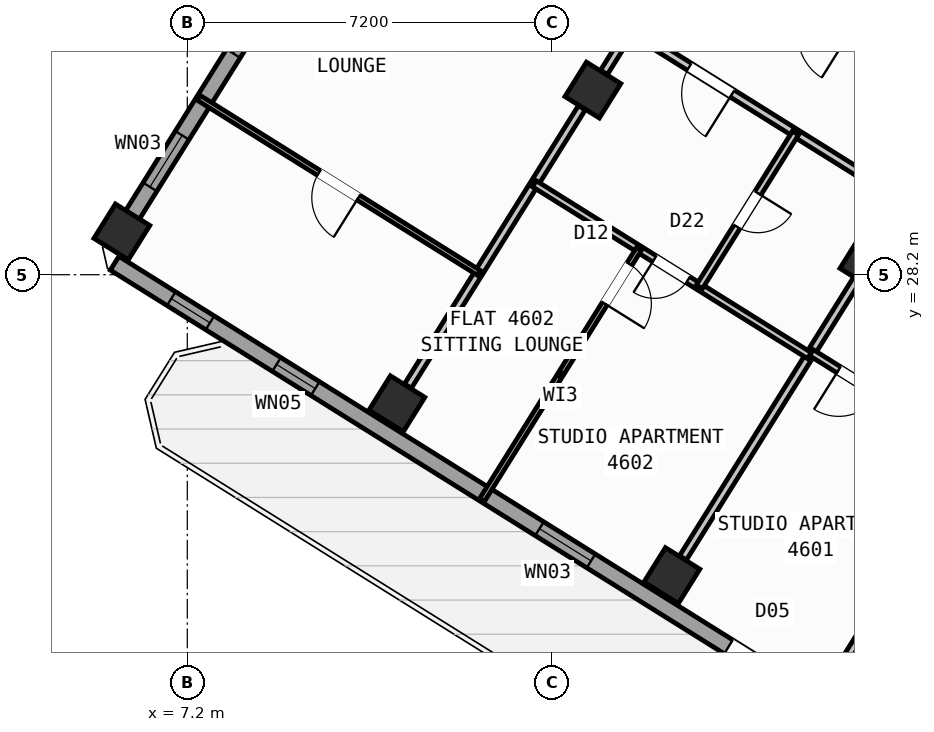
"""IFC4 building model, lengths in metres.
Left out: names, types, materials, properties, quantities, classifications, styles, units other than length and angle.
Written with IfcOpenShell. Run it as: python <this file> out.ifc"""

import sys

from ifc_helpers import new_model, si_unit, direction, frame, frame_2d, origin, origin_2d, place, context, subcontext, project, spatial, rectangle, hollow_rectangle, extrude, source, transform, mapped, element, fill, save


model = new_model("IFC4")
c1 = context("Model", 3, precision=1e-05, world=origin(), true_north=direction((0.0, 1.0)))
c2 = subcontext(c1, "Body", "Model", "MODEL_VIEW")
j1 = project(units=[si_unit("LENGTHUNIT", "METRE"), si_unit("PLANEANGLEUNIT", "RADIAN")], contexts=[c1])
p1 = place(None, origin())
s1 = spatial("IfcSite", under=j1, at=p1, CompositionType="ELEMENT")
p2 = place(p1, origin())
s2 = spatial("IfcBuilding", under=s1, at=p2, CompositionType="ELEMENT")
p3 = place(p2, frame((0.0, 0.0, 184.2)))
s3 = spatial("IfcBuildingStorey", under=s2, at=p3, CompositionType="ELEMENT", Elevation=184.2)
m1 = source(origin(), c2, "Body", "SweptSolid", [
    extrude(hollow_rectangle(XDim=0.8, YDim=0.8, WallThickness=0.032, at=origin_2d()), origin(), (0.0, 0.0, 1.0), 3.6),
])
for number, where, z_axis, x_axis in (
    (1, (20.632, 28.452, 0.0), (0.0, 0.0, 1.0), (-0.848, 0.53, 0.0)),
    (2, (16.764, 22.261, 0.0), (0.0, 0.0, 1.0), (-0.848, 0.53, 0.0)),
    (3, (15.205, 31.844, 0.0), (0.0, 0.0, 1.0), (-0.848, 0.53, 0.0)),
    (4, (11.336, 25.653, 0.0), (0.0, 0.0, 1.0), (-0.848, 0.53, 0.0)),
    (5, (5.909, 29.044, 0.0), (0.0, 0.0, 1.0), (-0.848, 0.53, 0.0)),
):
    element("IfcColumn", number, at=place(p3, frame(where, z_axis=z_axis, x_axis=x_axis)), inside=s3, PredefinedType="COLUMN", context=c2, shape_type="MappedRepresentation", body=[
        mapped(m1, transform((0.0, 0.0, 0.0), scale=1.0)),
    ])
p4 = place(p3, frame((31.76, 12.183, 0.0), z_axis=(0.0, 0.0, 1.0), x_axis=(-0.848047074256, 0.529920899612, 0.0)))
e6 = element("IfcWall", 6, at=p4, inside=s3, PredefinedType="STANDARD", context=c2, shape_type="SweptSolid", body=[
    extrude(rectangle(XDim=30.652, YDim=0.32, at=frame_2d((15.326, 0.0))), origin(), (0.0, 0.0, 1.0), 3.35),
])
p5 = place(p4, frame((15.166, 0.0, 0.0)))
e7 = element("IfcOpeningElement", 7, at=p5, cuts=e6, PredefinedType="OPENING", context=c2, shape_type="SweptSolid", body=[
    extrude(rectangle(XDim=1.2, YDim=2.15, at=frame_2d((0.6, 1.075))), frame((0.0, 0.17, 0.0), z_axis=(0.0, -1.0, 0.0), x_axis=(1.0, 0.0, 0.0)), (0.0, 0.0, 1.0), 0.34),
])
p6 = place(p4, frame((2.015, 0.0, 0.8)))
e8 = element("IfcOpeningElement", 8, at=p6, cuts=e6, PredefinedType="OPENING", context=c2, shape_type="SweptSolid", body=[
    extrude(rectangle(XDim=2.1, YDim=1.55, at=frame_2d((1.05, 0.775))), frame((0.0, 0.17, 0.0), z_axis=(0.0, -1.0, 0.0), x_axis=(1.0, 0.0, 0.0)), (0.0, 0.0, 1.0), 0.34),
])
p7 = place(p4, frame((7.244, 0.0, 0.8)))
e9 = element("IfcOpeningElement", 9, at=p7, cuts=e6, PredefinedType="OPENING", context=c2, shape_type="SweptSolid", body=[
    extrude(rectangle(XDim=2.1, YDim=1.55, at=frame_2d((1.05, 0.775))), frame((0.0, 0.17, 0.0), z_axis=(0.0, -1.0, 0.0), x_axis=(1.0, 0.0, 0.0)), (0.0, 0.0, 1.0), 0.34),
])
p8 = place(p4, frame((12.623, 0.0, 1.0)))
e10 = element("IfcOpeningElement", 10, at=p8, cuts=e6, PredefinedType="OPENING", context=c2, shape_type="SweptSolid", body=[
    extrude(rectangle(XDim=0.9, YDim=1.25, at=frame_2d((0.45, 0.625))), frame((0.0, 0.17, 0.0), z_axis=(0.0, -1.0, 0.0), x_axis=(1.0, 0.0, 0.0)), (0.0, 0.0, 1.0), 0.34),
])
p9 = place(p4, frame((19.565, 0.0, 0.95)))
e11 = element("IfcOpeningElement", 11, at=p9, cuts=e6, PredefinedType="OPENING", context=c2, shape_type="SweptSolid", body=[
    extrude(rectangle(XDim=1.2, YDim=1.4, at=frame_2d((0.6, 0.7))), frame((0.0, 0.17, 0.0), z_axis=(0.0, -1.0, 0.0), x_axis=(1.0, 0.0, 0.0)), (0.0, 0.0, 1.0), 0.34),
])
p10 = place(p4, frame((25.983, 0.0, 1.0)))
e12 = element("IfcOpeningElement", 12, at=p10, cuts=e6, PredefinedType="OPENING", context=c2, shape_type="SweptSolid", body=[
    extrude(rectangle(XDim=0.9, YDim=1.25, at=frame_2d((0.45, 0.625))), frame((0.0, 0.17, 0.0), z_axis=(0.0, -1.0, 0.0), x_axis=(1.0, 0.0, 0.0)), (0.0, 0.0, 1.0), 0.34),
])
p11 = place(p4, frame((28.433, 0.0, 1.0)))
e13 = element("IfcOpeningElement", 13, at=p11, cuts=e6, PredefinedType="OPENING", context=c2, shape_type="SweptSolid", body=[
    extrude(rectangle(XDim=0.9, YDim=1.25, at=frame_2d((0.45, 0.625))), frame((0.0, 0.17, 0.0), z_axis=(0.0, -1.0, 0.0), x_axis=(1.0, 0.0, 0.0)), (0.0, 0.0, 1.0), 0.34),
])
p12 = place(p3, frame((5.7, 28.71, 0.0), z_axis=(0.0, 0.0, 1.0), x_axis=(0.529923711467, 0.8480453172, 0.0)))
e14 = element("IfcWall", 14, at=p12, inside=s3, PredefinedType="STANDARD", context=c2, shape_type="SweptSolid", body=[
    extrude(rectangle(XDim=21.587, YDim=0.32, at=frame_2d((10.794, 0.0))), origin(), (0.0, 0.0, 1.0), 2.825),
])
p13 = place(p12, frame((1.44, 0.0, 0.95)))
e15 = element("IfcOpeningElement", 15, at=p13, cuts=e14, PredefinedType="OPENING", context=c2, shape_type="SweptSolid", body=[
    extrude(rectangle(XDim=1.2, YDim=1.4, at=frame_2d((0.6, 0.7))), frame((0.0, 0.17, 0.0), z_axis=(0.0, -1.0, 0.0), x_axis=(1.0, 0.0, 0.0)), (0.0, 0.0, 1.0), 0.34),
])
p14 = place(p12, frame((4.545, 0.0, 0.85)))
e16 = element("IfcOpeningElement", 16, at=p14, cuts=e14, PredefinedType="OPENING", context=c2, shape_type="SweptSolid", body=[
    extrude(rectangle(XDim=1.8, YDim=1.5, at=frame_2d((0.9, 0.75))), frame((0.0, 0.17, 0.0), z_axis=(0.0, -1.0, 0.0), x_axis=(1.0, 0.0, 0.0)), (0.0, 0.0, 1.0), 0.34),
])
p15 = place(p12, frame((12.139, 0.0, 1.0)))
e17 = element("IfcOpeningElement", 17, at=p15, cuts=e14, PredefinedType="OPENING", context=c2, shape_type="SweptSolid", body=[
    extrude(rectangle(XDim=0.9, YDim=1.25, at=frame_2d((0.45, 0.625))), frame((0.0, 0.17, 0.0), z_axis=(0.0, -1.0, 0.0), x_axis=(1.0, 0.0, 0.0)), (0.0, 0.0, 1.0), 0.34),
])
p16 = place(p12, frame((16.35, 0.0, 0.95)))
e18 = element("IfcOpeningElement", 18, at=p16, cuts=e14, PredefinedType="OPENING", context=c2, shape_type="SweptSolid", body=[
    extrude(rectangle(XDim=1.2, YDim=1.4, at=frame_2d((0.6, 0.7))), frame((0.0, 0.17, 0.0), z_axis=(0.0, -1.0, 0.0), x_axis=(1.0, 0.0, 0.0)), (0.0, 0.0, 1.0), 0.34),
])
p17 = place(p12, frame((18.762, 0.0, 0.95)))
e19 = element("IfcOpeningElement", 19, at=p17, cuts=e14, PredefinedType="OPENING", context=c2, shape_type="SweptSolid", body=[
    extrude(rectangle(XDim=1.2, YDim=1.4, at=frame_2d((0.6, 0.7))), frame((0.0, 0.17, 0.0), z_axis=(0.0, -1.0, 0.0), x_axis=(1.0, 0.0, 0.0)), (0.0, 0.0, 1.0), 0.34),
])
p18 = place(p3, frame((17.424, 47.083, 0.0), z_axis=(0.0, 0.0, 1.0), x_axis=(0.848049927979, -0.529916332693, 0.0)))
e20 = element("IfcWall", 20, at=p18, inside=s3, PredefinedType="STANDARD", context=c2, shape_type="SweptSolid", body=[
    extrude(rectangle(XDim=29.223, YDim=0.32, at=frame_2d((14.612, 0.0))), origin(), (0.0, 0.0, 1.0), 3.35),
])
p19 = place(p18, frame((3.764, 0.0, 0.0)))
e21 = element("IfcOpeningElement", 21, at=p19, cuts=e20, PredefinedType="OPENING", context=c2, shape_type="SweptSolid", body=[
    extrude(rectangle(XDim=1.05, YDim=2.15, at=frame_2d((0.525, 1.075))), frame((0.0, 0.17, 0.0), z_axis=(0.0, -1.0, 0.0), x_axis=(1.0, 0.0, 0.0)), (0.0, 0.0, 1.0), 0.34),
])
p20 = place(p18, frame((8.344, 0.0, 0.8)))
e22 = element("IfcOpeningElement", 22, at=p20, cuts=e20, PredefinedType="OPENING", context=c2, shape_type="SweptSolid", body=[
    extrude(rectangle(XDim=2.1, YDim=1.55, at=frame_2d((1.05, 0.775))), frame((0.0, 0.17, 0.0), z_axis=(0.0, -1.0, 0.0), x_axis=(1.0, 0.0, 0.0)), (0.0, 0.0, 1.0), 0.34),
])
p21 = place(p18, frame((13.589, 0.0, 0.85)))
e23 = element("IfcOpeningElement", 23, at=p21, cuts=e20, PredefinedType="OPENING", context=c2, shape_type="SweptSolid", body=[
    extrude(rectangle(XDim=1.8, YDim=1.5, at=frame_2d((0.9, 0.75))), frame((0.0, 0.17, 0.0), z_axis=(0.0, -1.0, 0.0), x_axis=(1.0, 0.0, 0.0)), (0.0, 0.0, 1.0), 0.34),
])
p22 = place(p18, frame((17.104, 0.0, 0.95)))
e24 = element("IfcOpeningElement", 24, at=p22, cuts=e20, PredefinedType="OPENING", context=c2, shape_type="SweptSolid", body=[
    extrude(rectangle(XDim=1.2, YDim=1.4, at=frame_2d((0.6, 0.7))), frame((0.0, 0.17, 0.0), z_axis=(0.0, -1.0, 0.0), x_axis=(1.0, 0.0, 0.0)), (0.0, 0.0, 1.0), 0.34),
])
p23 = place(p18, frame((21.214, 0.0, 0.95)))
e25 = element("IfcOpeningElement", 25, at=p23, cuts=e20, PredefinedType="OPENING", context=c2, shape_type="SweptSolid", body=[
    extrude(rectangle(XDim=1.2, YDim=1.4, at=frame_2d((0.6, 0.7))), frame((0.0, 0.17, 0.0), z_axis=(0.0, -1.0, 0.0), x_axis=(1.0, 0.0, 0.0)), (0.0, 0.0, 1.0), 0.34),
])
p24 = place(p18, frame((25.853, 0.0, 0.95)))
e26 = element("IfcOpeningElement", 26, at=p24, cuts=e20, PredefinedType="OPENING", context=c2, shape_type="SweptSolid", body=[
    extrude(rectangle(XDim=1.2, YDim=1.4, at=frame_2d((0.6, 0.7))), frame((0.0, 0.17, 0.0), z_axis=(0.0, -1.0, 0.0), x_axis=(1.0, 0.0, 0.0)), (0.0, 0.0, 1.0), 0.34),
])
p25 = place(p3, frame((24.588, 27.631, 0.0), z_axis=(0.0, 0.0, 1.0), x_axis=(-0.529914992377, -0.848050765494, 0.0)))
e27 = element("IfcWall", 27, at=p25, inside=s3, PredefinedType="PARTITIONING", context=c2, shape_type="SweptSolid", body=[
    extrude(rectangle(XDim=9.15, YDim=0.16, at=frame_2d((4.575, 0.0))), origin(), (0.0, 0.0, 1.0), 3.34),
])
p26 = place(p3, frame((25.754, 29.497, 0.0), z_axis=(0.0, 0.0, 1.0), x_axis=(-0.848045850158, 0.529922858565, 0.0)))
e28 = element("IfcWall", 28, at=p26, inside=s3, PredefinedType="PARTITIONING", context=c2, shape_type="SweptSolid", body=[
    extrude(rectangle(XDim=16.73, YDim=0.16, at=frame_2d((8.365, 0.0))), origin(), (0.0, 0.0, 1.0), 3.34),
])
p27 = place(p26, frame((2.22, 0.0, 0.0)))
e29 = element("IfcOpeningElement", 29, at=p27, cuts=e28, PredefinedType="OPENING", context=c2, shape_type="SweptSolid", body=[
    extrude(rectangle(XDim=0.86, YDim=2.05, at=frame_2d((0.43, 1.025))), frame((0.0, 0.09, 0.0), z_axis=(0.0, -1.0, 0.0), x_axis=(1.0, 0.0, 0.0)), (0.0, 0.0, 1.0), 0.18),
])
p28 = place(p26, frame((6.49, 0.0, 0.0)))
e30 = element("IfcOpeningElement", 30, at=p28, cuts=e28, PredefinedType="OPENING", context=c2, shape_type="SweptSolid", body=[
    extrude(rectangle(XDim=1.0, YDim=2.1, at=frame_2d((0.5, 1.05))), frame((0.0, 0.09, 0.0), z_axis=(0.0, -1.0, 0.0), x_axis=(1.0, 0.0, 0.0)), (0.0, 0.0, 1.0), 0.18),
])
p29 = place(p26, frame((14.304, 0.0, 0.0)))
e31 = element("IfcOpeningElement", 31, at=p29, cuts=e28, PredefinedType="OPENING", context=c2, shape_type="SweptSolid", body=[
    extrude(rectangle(XDim=1.0, YDim=2.1, at=frame_2d((0.5, 1.05))), frame((0.0, 0.09, 0.0), z_axis=(0.0, -1.0, 0.0), x_axis=(1.0, 0.0, 0.0)), (0.0, 0.0, 1.0), 0.18),
])
p30 = place(p3, frame((24.588, 27.631, 0.0), z_axis=(0.0, 0.0, 1.0), x_axis=(-0.848041752158, 0.529929416617, 0.0)))
e32 = element("IfcWall", 32, at=p30, inside=s3, PredefinedType="PARTITIONING", context=c2, shape_type="SweptSolid", body=[
    extrude(rectangle(XDim=16.73, YDim=0.16, at=frame_2d((8.365, 0.0))), origin(), (0.0, 0.0, 1.0), 3.34),
])
p31 = place(p30, frame((2.22, 0.0, 0.0)))
e33 = element("IfcOpeningElement", 33, at=p31, cuts=e32, PredefinedType="OPENING", context=c2, shape_type="SweptSolid", body=[
    extrude(rectangle(XDim=0.86, YDim=2.05, at=frame_2d((0.43, 1.025))), frame((0.0, 0.09, 0.0), z_axis=(0.0, -1.0, 0.0), x_axis=(1.0, 0.0, 0.0)), (0.0, 0.0, 1.0), 0.18),
])
p32 = place(p30, frame((7.82, 0.0, 0.0)))
e34 = element("IfcOpeningElement", 34, at=p32, cuts=e32, PredefinedType="OPENING", context=c2, shape_type="SweptSolid", body=[
    extrude(rectangle(XDim=1.0, YDim=2.1, at=frame_2d((0.5, 1.05))), frame((0.0, 0.09, 0.0), z_axis=(0.0, -1.0, 0.0), x_axis=(1.0, 0.0, 0.0)), (0.0, 0.0, 1.0), 0.18),
])
p33 = place(p30, frame((12.95, 0.0, 0.0)))
e35 = element("IfcOpeningElement", 35, at=p33, cuts=e32, PredefinedType="OPENING", context=c2, shape_type="SweptSolid", body=[
    extrude(rectangle(XDim=1.0, YDim=2.1, at=frame_2d((0.5, 1.05))), frame((0.0, 0.09, 0.0), z_axis=(0.0, -1.0, 0.0), x_axis=(1.0, 0.0, 0.0)), (0.0, 0.0, 1.0), 0.18),
])
p34 = place(p3, frame((20.414, 28.103, 0.0), z_axis=(0.0, 0.0, 1.0), x_axis=(-0.529934553702, -0.848038542045, 0.0)))
e36 = element("IfcWall", 36, at=p34, inside=s3, PredefinedType="PARTITIONING", context=c2, shape_type="SweptSolid", body=[
    extrude(rectangle(XDim=6.476, YDim=0.16, at=frame_2d((3.238, 0.0))), origin(), (0.0, 0.0, 1.0), 2.825),
])
p35 = place(p3, frame((22.728, 24.654, 0.0), z_axis=(0.0, 0.0, 1.0), x_axis=(-0.848059820872, 0.529900500304, 0.0)))
e37 = element("IfcWall", 37, at=p35, inside=s3, PredefinedType="PLUMBINGWALL", context=c2, shape_type="SweptSolid", body=[
    extrude(rectangle(XDim=3.79, YDim=0.14, at=frame_2d((1.895, 0.0))), origin(), (0.0, 0.0, 1.0), 3.34),
])
p36 = place(p35, frame((2.23, 0.0, 0.0)))
e38 = element("IfcOpeningElement", 38, at=p36, cuts=e37, PredefinedType="OPENING", context=c2, shape_type="SweptSolid", body=[
    extrude(rectangle(XDim=0.92, YDim=2.08, at=frame_2d((0.46, 1.04))), frame((0.0, 0.08, 0.0), z_axis=(0.0, -1.0, 0.0), x_axis=(1.0, 0.0, 0.0)), (0.0, 0.0, 1.0), 0.16),
])
p37 = place(p3, frame((15.946, 33.031, 0.0), z_axis=(0.0, 0.0, 1.0), x_axis=(-0.529821225456, -0.848109349704, 0.0)))
e39 = element("IfcWall", 39, at=p37, inside=s3, PredefinedType="PARTITIONING", context=c2, shape_type="SweptSolid", body=[
    extrude(rectangle(XDim=0.988, YDim=0.16, at=frame_2d((0.494, 0.0))), origin(), (0.0, 0.0, 1.0), 2.825),
])
p38 = place(p3, frame((14.986, 31.494, 0.0), z_axis=(0.0, 0.0, 1.0), x_axis=(-0.529907440938, -0.848055484057, 0.0)))
e40 = element("IfcWall", 40, at=p38, inside=s3, PredefinedType="PARTITIONING", context=c2, shape_type="SweptSolid", body=[
    extrude(rectangle(XDim=6.476, YDim=0.16, at=frame_2d((3.238, 0.0))), origin(), (0.0, 0.0, 1.0), 2.825),
])
p39 = place(p3, frame((19.477, 26.603, 0.0), z_axis=(0.0, 0.0, 1.0), x_axis=(-0.848039019877, 0.529933789039, 0.0)))
e41 = element("IfcWall", 41, at=p39, inside=s3, PredefinedType="PLUMBINGWALL", context=c2, shape_type="SweptSolid", body=[
    extrude(rectangle(XDim=6.4, YDim=0.14, at=frame_2d((3.2, 0.0))), origin(), (0.0, 0.0, 1.0), 3.34),
])
p40 = place(p39, frame((2.824, 0.0, 0.0)))
e42 = element("IfcOpeningElement", 42, at=p40, cuts=e41, PredefinedType="OPENING", context=c2, shape_type="SweptSolid", body=[
    extrude(rectangle(XDim=0.78, YDim=2.05, at=frame_2d((0.39, 1.025))), frame((0.0, 0.08, 0.0), z_axis=(0.0, -1.0, 0.0), x_axis=(1.0, 0.0, 0.0)), (0.0, 0.0, 1.0), 0.16),
])
p41 = place(p3, frame((19.203, 30.996, 0.0), z_axis=(0.0, 0.0, 1.0), x_axis=(-0.529906983049, -0.848055770169, 0.0)))
e43 = element("IfcWall", 43, at=p41, inside=s3, PredefinedType="PLUMBINGWALL", context=c2, shape_type="SweptSolid", body=[
    extrude(rectangle(XDim=3.58, YDim=0.14, at=frame_2d((1.79, 0.0))), origin(), (0.0, 0.0, 1.0), 3.34),
])
p42 = place(p41, frame((1.4, 0.0, 0.0)))
e44 = element("IfcOpeningElement", 44, at=p42, cuts=e43, PredefinedType="OPENING", context=c2, shape_type="SweptSolid", body=[
    extrude(rectangle(XDim=0.78, YDim=2.05, at=frame_2d((0.39, 1.025))), frame((0.0, 0.08, 0.0), z_axis=(0.0, -1.0, 0.0), x_axis=(1.0, 0.0, 0.0)), (0.0, 0.0, 1.0), 0.16),
])
p43 = place(p3, frame((16.112, 28.706, 0.0), z_axis=(0.0, 0.0, 1.0), x_axis=(-0.529916267533, -0.848049968695, 0.0)))
e45 = element("IfcWall", 45, at=p43, inside=s3, PredefinedType="PARTITIONING", context=c2, shape_type="SweptSolid", body=[
    extrude(rectangle(XDim=5.84, YDim=0.11, at=frame_2d((2.92, 0.0))), origin(), (0.0, 0.0, 1.0), 3.34),
])
p44 = place(p43, frame((0.35, 0.0, 0.0)))
e46 = element("IfcOpeningElement", 46, at=p44, cuts=e45, PredefinedType="OPENING", context=c2, shape_type="SweptSolid", body=[
    extrude(rectangle(XDim=0.92, YDim=2.08, at=frame_2d((0.46, 1.04))), frame((0.0, 0.065, 0.0), z_axis=(0.0, -1.0, 0.0), x_axis=(1.0, 0.0, 0.0)), (0.0, 0.0, 1.0), 0.13),
])
p45 = place(p3, frame((12.951, 28.238, 0.0), z_axis=(0.0, 0.0, 1.0), x_axis=(-0.848031959833, 0.529945086874, 0.0)))
e47 = element("IfcWall", 47, at=p45, inside=s3, PredefinedType="PARTITIONING", context=c2, shape_type="SweptSolid", body=[
    extrude(rectangle(XDim=6.52, YDim=0.11, at=frame_2d((3.26, 0.0))), origin(), (0.0, 0.0, 1.0), 3.34),
])
p46 = place(p45, frame((2.8, 0.0, 0.0)))
e48 = element("IfcOpeningElement", 48, at=p46, cuts=e47, PredefinedType="OPENING", context=c2, shape_type="SweptSolid", body=[
    extrude(rectangle(XDim=0.92, YDim=2.08, at=frame_2d((0.46, 1.04))), frame((0.0, 0.065, 0.0), z_axis=(0.0, -1.0, 0.0), x_axis=(1.0, 0.0, 0.0)), (0.0, 0.0, 1.0), 0.13),
])
m2 = source(origin(), c2, "Body", "SweptSolid", [
    extrude(rectangle(XDim=1.2, YDim=2.15, at=frame_2d((0.6, 1.075))), frame((0.0, 0.025, 0.0), z_axis=(0.0, -1.0, 0.0), x_axis=(1.0, 0.0, 0.0)), (0.0, 0.0, 1.0), 0.05),
])
p47 = place(p5, origin())
e49 = element("IfcDoor", 49, at=p47, inside=s3, OperationType="SINGLE_SWING_LEFT", PredefinedType="DOOR", context=c2, shape_type="MappedRepresentation", body=[
    mapped(m2, transform((0.0, 0.0, 0.0), scale=1.0)),
])
fill(e7, e49)
m3 = source(origin(), c2, "Body", "SweptSolid", [
    extrude(rectangle(XDim=1.2, YDim=1.4, at=frame_2d((0.6, 0.7))), frame((0.0, 0.03, 0.0), z_axis=(0.0, -1.0, 0.0), x_axis=(1.0, 0.0, 0.0)), (0.0, 0.0, 1.0), 0.06),
])
p48 = place(p9, origin())
e50 = element("IfcWindow", 50, at=p48, inside=s3, PartitioningType="SINGLE_PANEL", PredefinedType="WINDOW", context=c2, shape_type="MappedRepresentation", body=[
    mapped(m3, transform((0.0, 0.0, 0.0), scale=1.0)),
])
fill(e11, e50)
m4 = source(origin(), c2, "Body", "SweptSolid", [
    extrude(rectangle(XDim=0.9, YDim=1.25, at=frame_2d((0.45, 0.625))), frame((0.0, 0.03, 0.0), z_axis=(0.0, -1.0, 0.0), x_axis=(1.0, 0.0, 0.0)), (0.0, 0.0, 1.0), 0.06),
])
p49 = place(p10, origin())
e51 = element("IfcWindow", 51, at=p49, inside=s3, PartitioningType="SINGLE_PANEL", PredefinedType="WINDOW", context=c2, shape_type="MappedRepresentation", body=[
    mapped(m4, transform((0.0, 0.0, 0.0), scale=1.0)),
])
fill(e12, e51)
p50 = place(p11, origin())
e52 = element("IfcWindow", 52, at=p50, inside=s3, PartitioningType="SINGLE_PANEL", PredefinedType="WINDOW", context=c2, shape_type="MappedRepresentation", body=[
    mapped(m4, transform((0.0, 0.0, 0.0), scale=1.0)),
])
fill(e13, e52)
p51 = place(p13, origin())
e53 = element("IfcWindow", 53, at=p51, inside=s3, PartitioningType="SINGLE_PANEL", PredefinedType="WINDOW", context=c2, shape_type="MappedRepresentation", body=[
    mapped(m3, transform((0.0, 0.0, 0.0), scale=1.0)),
])
fill(e15, e53)
m5 = source(origin(), c2, "Body", "SweptSolid", [
    extrude(rectangle(XDim=1.8, YDim=1.5, at=frame_2d((0.9, 0.75))), frame((0.0, 0.03, 0.0), z_axis=(0.0, -1.0, 0.0), x_axis=(1.0, 0.0, 0.0)), (0.0, 0.0, 1.0), 0.06),
])
p52 = place(p14, origin())
e54 = element("IfcWindow", 54, at=p52, inside=s3, PartitioningType="SINGLE_PANEL", PredefinedType="WINDOW", context=c2, shape_type="MappedRepresentation", body=[
    mapped(m5, transform((0.0, 0.0, 0.0), scale=1.0)),
])
fill(e16, e54)
m6 = source(origin(), c2, "Body", "SweptSolid", [
    extrude(rectangle(XDim=0.92, YDim=2.08, at=frame_2d((0.46, 1.04))), frame((0.0, 0.025, 0.0), z_axis=(0.0, -1.0, 0.0), x_axis=(1.0, 0.0, 0.0)), (0.0, 0.0, 1.0), 0.05),
])
p53 = place(p36, origin())
e55 = element("IfcDoor", 55, at=p53, inside=s3, OperationType="SINGLE_SWING_RIGHT", PredefinedType="DOOR", context=c2, shape_type="MappedRepresentation", body=[
    mapped(m6, transform((0.0, 0.0, 0.0), scale=1.0)),
])
fill(e38, e55)
p54 = place(p44, origin())
e56 = element("IfcDoor", 56, at=p54, inside=s3, OperationType="SINGLE_SWING_RIGHT", PredefinedType="DOOR", context=c2, shape_type="MappedRepresentation", body=[
    mapped(m6, transform((0.0, 0.0, 0.0), scale=1.0)),
])
fill(e46, e56)
m7 = source(origin(), c2, "Body", "SweptSolid", [
    extrude(rectangle(XDim=1.0, YDim=2.1, at=frame_2d((0.5, 1.05))), frame((0.0, 0.025, 0.0), z_axis=(0.0, -1.0, 0.0), x_axis=(1.0, 0.0, 0.0)), (0.0, 0.0, 1.0), 0.05),
])
p55 = place(p32, origin())
e57 = element("IfcDoor", 57, at=p55, inside=s3, OperationType="SINGLE_SWING_LEFT", PredefinedType="DOOR", context=c2, shape_type="MappedRepresentation", body=[
    mapped(m7, transform((0.0, 0.0, 0.0), scale=1.0)),
])
fill(e34, e57)
m8 = source(origin(), c2, "Body", "SweptSolid", [
    extrude(rectangle(XDim=0.78, YDim=2.05, at=frame_2d((0.39, 1.025))), frame((0.0, 0.025, 0.0), z_axis=(0.0, -1.0, 0.0), x_axis=(1.0, 0.0, 0.0)), (0.0, 0.0, 1.0), 0.05),
])
p56 = place(p40, origin())
e58 = element("IfcDoor", 58, at=p56, inside=s3, OperationType="SINGLE_SWING_RIGHT", PredefinedType="DOOR", context=c2, shape_type="MappedRepresentation", body=[
    mapped(m8, transform((0.0, 0.0, 0.0), scale=1.0)),
])
fill(e42, e58)
p57 = place(p42, origin())
e59 = element("IfcDoor", 59, at=p57, inside=s3, OperationType="SINGLE_SWING_LEFT", PredefinedType="DOOR", context=c2, shape_type="MappedRepresentation", body=[
    mapped(m8, transform((0.0, 0.0, 0.0), scale=1.0)),
])
fill(e44, e59)
p58 = place(p46, origin())
e60 = element("IfcDoor", 60, at=p58, inside=s3, OperationType="SINGLE_SWING_LEFT", PredefinedType="DOOR", context=c2, shape_type="MappedRepresentation", body=[
    mapped(m6, transform((0.0, 0.0, 0.0), scale=1.0)),
])
fill(e48, e60)
save(model, sys.argv[1])
